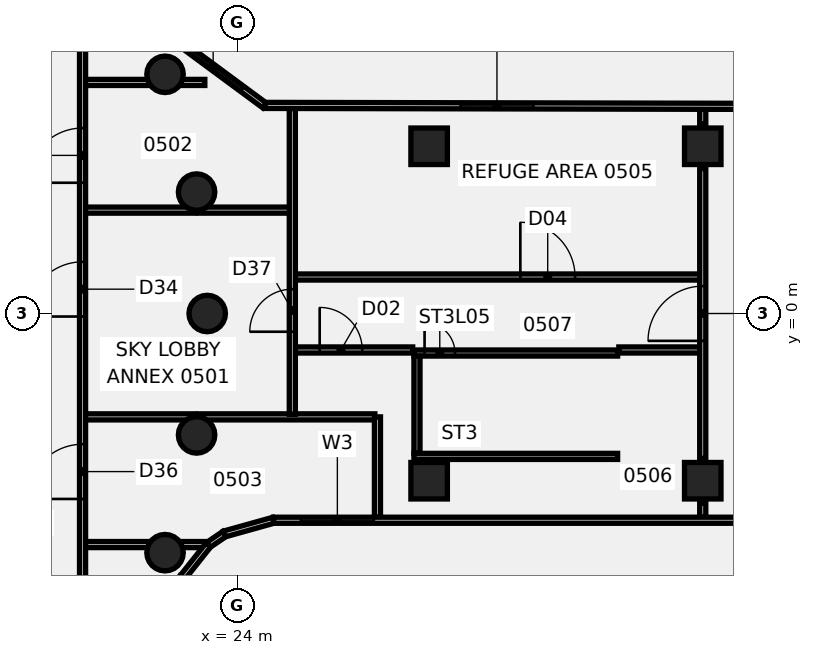
"""IFC4 building model, lengths in metres.
Left out: names, types, materials, properties, quantities, classifications, styles, units other than length and angle.
Written with IfcOpenShell. Run it as: python <this file> out.ifc"""

import sys

from ifc_helpers import new_model, si_unit, direction, frame, frame_2d, origin, origin_2d, place, context, subcontext, project, spatial, polyline, rectangle, circle, outline, extrude, element, fill, save


model = new_model("IFC4")
c1 = context("Model", 3, precision=1e-05, world=origin(), true_north=direction((0.0, 1.0)))
c2 = subcontext(c1, "Body", "Model", "MODEL_VIEW")
j1 = project(units=[si_unit("LENGTHUNIT", "METRE"), si_unit("PLANEANGLEUNIT", "RADIAN")], contexts=[c1])
p1 = place(None, origin())
s1 = spatial("IfcSite", under=j1, at=p1, CompositionType="ELEMENT")
p2 = place(p1, origin())
s2 = spatial("IfcBuilding", under=s1, at=p2, CompositionType="ELEMENT")
p3 = place(p2, frame((0.0, 0.0, 29.5)))
s3 = spatial("IfcBuildingStorey", under=s2, at=p3, CompositionType="ELEMENT", Elevation=29.5)
for number, where, z_axis, x_axis in (
    (1, (23.0, 0.0, -0.6), (0.0, 0.0, 1.0), (1.0, 0.0, 0.0)),
    (2, (22.651, 3.994, -0.6), (0.0, 0.0, 1.0), (1.0, 0.0, 0.0)),
    (3, (21.613, 7.866, -0.6), (0.0, 0.0, 1.0), (1.0, 0.0, 0.0)),
    (4, (21.613, -7.866, -0.6), (0.0, 0.0, 1.0), (1.0, 0.0, 0.0)),
    (5, (22.651, -3.994, -0.6), (0.0, 0.0, 1.0), (1.0, 0.0, 0.0)),
):
    element("IfcColumn", number, at=place(p3, frame(where, z_axis=z_axis, x_axis=x_axis)), inside=s3, PredefinedType="COLUMN", context=c2, shape_type="SweptSolid", body=[
        extrude(circle(Radius=0.6, at=origin_2d()), origin(), (0.0, 0.0, 1.0), 4.96),
    ])
p4 = place(p3, frame((39.3, 5.5, -0.6), z_axis=(0.0, 0.0, 1.0), x_axis=(1.0, 0.0, 0.0)))
e6 = element("IfcColumn", 6, at=p4, inside=s3, PredefinedType="COLUMN", context=c2, shape_type="SweptSolid", body=[
    extrude(rectangle(XDim=1.2, YDim=1.2, at=origin_2d()), origin(), (0.0, 0.0, 1.0), 4.926),
])
p5 = place(p3, frame((39.3, -5.5, -0.6), z_axis=(0.0, 0.0, 1.0), x_axis=(1.0, 0.0, 0.0)))
e7 = element("IfcColumn", 7, at=p5, inside=s3, PredefinedType="COLUMN", context=c2, shape_type="SweptSolid", body=[
    extrude(rectangle(XDim=1.2, YDim=1.2, at=origin_2d()), origin(), (0.0, 0.0, 1.0), 4.926),
])
for number, where, z_axis, x_axis in (
    (8, (30.3, 5.5, -0.6), (0.0, 0.0, 1.0), (1.0, 0.0, 0.0)),
    (9, (30.3, -5.5, -0.6), (0.0, 0.0, 1.0), (1.0, 0.0, 0.0)),
):
    element("IfcColumn", number, at=place(p3, frame(where, z_axis=z_axis, x_axis=x_axis)), inside=s3, PredefinedType="COLUMN", context=c2, shape_type="SweptSolid", body=[
        extrude(rectangle(XDim=1.2, YDim=1.2, at=origin_2d()), origin(), (0.0, 0.0, 1.0), 4.939),
    ])
p6 = place(p3, frame((25.885, -1.2, 0.0), z_axis=(0.0, 0.0, 1.0), x_axis=(1.0, 0.0, 0.0)))
e10 = element("IfcWall", 10, at=p6, inside=s3, PredefinedType="PARTITIONING", context=c2, shape_type="SweptSolid", body=[
    extrude(rectangle(XDim=3.875, YDim=0.2, at=frame_2d((1.938, 0.0))), origin(), (0.0, 0.0, 1.0), 3.76),
])
p7 = place(p6, frame((0.815, 0.0, 0.0)))
e11 = element("IfcOpeningElement", 11, at=p7, cuts=e10, PredefinedType="OPENING", context=c2, shape_type="SweptSolid", body=[
    extrude(rectangle(XDim=1.4, YDim=2.1, at=frame_2d((0.7, 1.05))), frame((0.0, 0.11, 0.0), z_axis=(0.0, -1.0, 0.0), x_axis=(1.0, 0.0, 0.0)), (0.0, 0.0, 1.0), 0.22),
])
p8 = place(p3, frame((36.54, -1.2, 0.0), z_axis=(0.0, 0.0, 1.0), x_axis=(1.0, 0.0, 0.0)))
e12 = element("IfcWall", 12, at=p8, inside=s3, PredefinedType="PARTITIONING", context=c2, shape_type="SweptSolid", body=[
    extrude(rectangle(XDim=2.68, YDim=0.2, at=frame_2d((1.34, 0.0))), origin(), (0.0, 0.0, 1.0), 3.76),
])
p9 = place(p3, frame((25.885, 1.2, 0.0), z_axis=(0.0, 0.0, 1.0), x_axis=(1.0, 0.0, 0.0)))
e13 = element("IfcWall", 13, at=p9, inside=s3, PredefinedType="PARTITIONING", context=c2, shape_type="SweptSolid", body=[
    extrude(rectangle(XDim=13.335, YDim=0.2, at=frame_2d((6.667, 0.0))), origin(), (0.0, 0.0, 1.0), 3.76),
])
p10 = place(p9, frame((7.415, 0.0, 0.0)))
e14 = element("IfcOpeningElement", 14, at=p10, cuts=e13, PredefinedType="OPENING", context=c2, shape_type="SweptSolid", body=[
    extrude(rectangle(XDim=1.8, YDim=2.1, at=frame_2d((0.9, 1.05))), frame((0.0, 0.11, 0.0), z_axis=(0.0, -1.0, 0.0), x_axis=(1.0, 0.0, 0.0)), (0.0, 0.0, 1.0), 0.22),
])
p11 = place(p3, frame((18.985, 3.4, 0.0), z_axis=(0.0, 0.0, 1.0), x_axis=(1.0, 0.0, 0.0)))
e15 = element("IfcWall", 15, at=p11, inside=s3, PredefinedType="PARTITIONING", context=c2, shape_type="SweptSolid", body=[
    extrude(rectangle(XDim=3.605, YDim=0.2, at=frame_2d((1.803, 0.0))), origin(), (0.0, 0.0, 1.0), 3.76),
])
p12 = place(p3, frame((22.711, 3.4, 0.0), z_axis=(0.0, 0.0, 1.0), x_axis=(1.0, 0.0, 0.0)))
e16 = element("IfcWall", 16, at=p12, inside=s3, PredefinedType="PARTITIONING", context=c2, shape_type="SweptSolid", body=[
    extrude(rectangle(XDim=3.004, YDim=0.2, at=frame_2d((1.502, 0.0))), origin(), (0.0, 0.0, 1.0), 3.76),
])
p13 = place(p3, frame((18.985, -3.4, 0.0), z_axis=(0.0, 0.0, 1.0), x_axis=(1.0, 0.0, 0.0)))
e17 = element("IfcWall", 17, at=p13, inside=s3, PredefinedType="PARTITIONING", context=c2, shape_type="SweptSolid", body=[
    extrude(rectangle(XDim=3.605, YDim=0.2, at=frame_2d((1.803, 0.0))), origin(), (0.0, 0.0, 1.0), 3.76),
])
p14 = place(p3, frame((22.711, -3.4, 0.0), z_axis=(0.0, 0.0, 1.0), x_axis=(1.0, 0.0, 0.0)))
e18 = element("IfcWall", 18, at=p14, inside=s3, PredefinedType="PARTITIONING", context=c2, shape_type="SweptSolid", body=[
    extrude(rectangle(XDim=5.804, YDim=0.2, at=frame_2d((2.902, 0.0))), origin(), (0.0, 0.0, 1.0), 3.76),
])
p15 = place(p3, frame((18.985, -7.6, 0.0), z_axis=(0.0, 0.0, 1.0), x_axis=(1.0, 0.0, 0.0)))
e19 = element("IfcWall", 19, at=p15, inside=s3, PredefinedType="PARTITIONING", context=c2, shape_type="SweptSolid", body=[
    extrude(rectangle(XDim=2.089, YDim=0.2, at=frame_2d((1.044, 0.0))), origin(), (0.0, 0.0, 1.0), 3.76),
])
p16 = place(p3, frame((22.152, -7.6, 0.0), z_axis=(0.0, 0.0, 1.0), x_axis=(1.0, 0.0, 0.0)))
e20 = element("IfcWall", 20, at=p16, inside=s3, PredefinedType="PARTITIONING", context=c2, shape_type="SweptSolid", body=[
    extrude(rectangle(XDim=0.769, YDim=0.2, at=frame_2d((0.385, 0.0))), origin(), (0.0, 0.0, 1.0), 3.76),
])
p17 = place(p3, frame((18.985, 7.6, 0.0), z_axis=(0.0, 0.0, 1.0), x_axis=(1.0, 0.0, 0.0)))
e21 = element("IfcWall", 21, at=p17, inside=s3, PredefinedType="PARTITIONING", context=c2, shape_type="SweptSolid", body=[
    extrude(rectangle(XDim=2.089, YDim=0.2, at=frame_2d((1.044, 0.0))), origin(), (0.0, 0.0, 1.0), 3.76),
])
p18 = place(p3, frame((22.152, 7.6, 0.0), z_axis=(0.0, 0.0, 1.0), x_axis=(1.0, 0.0, 0.0)))
e22 = element("IfcWall", 22, at=p18, inside=s3, PredefinedType="PARTITIONING", context=c2, shape_type="SweptSolid", body=[
    extrude(rectangle(XDim=0.77, YDim=0.2, at=frame_2d((0.385, 0.0))), origin(), (0.0, 0.0, 1.0), 3.76),
])
p19 = place(p3, frame((18.9, -10.1, 0.0), z_axis=(0.0, 0.0, 1.0), x_axis=(0.0, 1.0, 0.0)))
e23 = element("IfcWall", 23, at=p19, inside=s3, PredefinedType="PARTITIONING", context=c2, shape_type="SweptSolid", body=[
    extrude(rectangle(XDim=20.2, YDim=0.2, at=frame_2d((10.1, 0.0))), origin(), (0.0, 0.0, 1.0), 3.76),
])
p20 = place(p19, frame((10.0, 0.0, 0.0)))
e24 = element("IfcOpeningElement", 24, at=p20, cuts=e23, PredefinedType="OPENING", context=c2, shape_type="SweptSolid", body=[
    extrude(rectangle(XDim=1.8, YDim=2.1, at=frame_2d((0.9, 1.05))), frame((0.0, 0.11, 0.0), z_axis=(0.0, -1.0, 0.0), x_axis=(1.0, 0.0, 0.0)), (0.0, 0.0, 1.0), 0.22),
])
p21 = place(p19, frame((14.4, 0.0, 0.0)))
e25 = element("IfcOpeningElement", 25, at=p21, cuts=e23, PredefinedType="OPENING", context=c2, shape_type="SweptSolid", body=[
    extrude(rectangle(XDim=1.8, YDim=2.1, at=frame_2d((0.9, 1.05))), frame((0.0, 0.11, 0.0), z_axis=(0.0, -1.0, 0.0), x_axis=(1.0, 0.0, 0.0)), (0.0, 0.0, 1.0), 0.22),
])
p22 = place(p19, frame((4.0, 0.0, 0.0)))
e26 = element("IfcOpeningElement", 26, at=p22, cuts=e23, PredefinedType="OPENING", context=c2, shape_type="SweptSolid", body=[
    extrude(rectangle(XDim=1.8, YDim=2.1, at=frame_2d((0.9, 1.05))), frame((0.0, 0.11, 0.0), z_axis=(0.0, -1.0, 0.0), x_axis=(1.0, 0.0, 0.0)), (0.0, 0.0, 1.0), 0.22),
])
p23 = place(p3, frame((25.8, -3.315, 0.0), z_axis=(0.0, 0.0, 1.0), x_axis=(0.0, 1.0, 0.0)))
e27 = element("IfcWall", 27, at=p23, inside=s3, PredefinedType="PARTITIONING", context=c2, shape_type="SweptSolid", body=[
    extrude(rectangle(XDim=10.057, YDim=0.2, at=frame_2d((5.028, 0.0))), origin(), (0.0, 0.0, 1.0), 3.76),
])
p24 = place(p23, frame((2.715, 0.0, 0.0)))
e28 = element("IfcOpeningElement", 28, at=p24, cuts=e27, PredefinedType="OPENING", context=c2, shape_type="SweptSolid", body=[
    extrude(rectangle(XDim=1.4, YDim=2.1, at=frame_2d((0.7, 1.05))), frame((0.0, 0.11, 0.0), z_axis=(0.0, -1.0, 0.0), x_axis=(1.0, 0.0, 0.0)), (0.0, 0.0, 1.0), 0.22),
])
p25 = place(p3, frame((28.6, -6.699, 0.0), z_axis=(0.0, 0.0, 1.0), x_axis=(0.0, 1.0, 0.0)))
e29 = element("IfcWall", 29, at=p25, inside=s3, PredefinedType="PARTITIONING", context=c2, shape_type="SweptSolid", body=[
    extrude(rectangle(XDim=3.299, YDim=0.2, at=frame_2d((1.649, 0.0))), origin(), (0.0, 0.0, 1.0), 3.76),
])
p26 = place(p3, frame((39.3, -6.699, 0.0), z_axis=(0.0, 0.0, 1.0), x_axis=(0.0, 1.0, 0.0)))
e30 = element("IfcWall", 30, at=p26, inside=s3, PredefinedType="PARTITIONING", context=c2, shape_type="SweptSolid", body=[
    extrude(rectangle(XDim=0.469, YDim=0.2, at=frame_2d((0.234, 0.0))), origin(), (0.0, 0.0, 1.0), 3.76),
])
p27 = place(p3, frame((39.3, -4.77, 0.0), z_axis=(0.0, 0.0, 1.0), x_axis=(0.0, 1.0, 0.0)))
e31 = element("IfcWall", 31, at=p27, inside=s3, PredefinedType="PARTITIONING", context=c2, shape_type="SweptSolid", body=[
    extrude(rectangle(XDim=9.54, YDim=0.2, at=frame_2d((4.77, 0.0))), origin(), (0.0, 0.0, 1.0), 3.76),
])
p28 = place(p27, frame((3.87, 0.0, 0.0)))
e32 = element("IfcOpeningElement", 32, at=p28, cuts=e31, PredefinedType="OPENING", context=c2, shape_type="SweptSolid", body=[
    extrude(rectangle(XDim=1.8, YDim=2.1, at=frame_2d((0.9, 1.05))), frame((0.0, 0.11, 0.0), z_axis=(0.0, -1.0, 0.0), x_axis=(1.0, 0.0, 0.0)), (0.0, 0.0, 1.0), 0.22),
])
p29 = place(p3, frame((39.3, 6.23, 0.0), z_axis=(0.0, 0.0, 1.0), x_axis=(0.0, 1.0, 0.0)))
e33 = element("IfcWall", 33, at=p29, inside=s3, PredefinedType="PARTITIONING", context=c2, shape_type="SweptSolid", body=[
    extrude(rectangle(XDim=0.485, YDim=0.2, at=frame_2d((0.243, 0.0))), origin(), (0.0, 0.0, 1.0), 3.76),
])
p30 = place(p3, frame((22.185, -8.687, 0.0), z_axis=(0.0, 0.0, 1.0), x_axis=(0.62233065952, 0.782754463559, 0.0)))
e34 = element("IfcWall", 34, at=p30, inside=s3, PredefinedType="SOLIDWALL", context=c2, shape_type="SweptSolid", body=[
    extrude(rectangle(XDim=1.374, YDim=0.2, at=frame_2d((0.687, 0.0))), origin(), (0.0, 0.0, 1.0), 4.36),
])
p31 = place(p3, frame((23.041, -7.611, 0.0), z_axis=(0.0, 0.0, 1.0), x_axis=(0.825718659987, 0.564082170033, 0.0)))
e35 = element("IfcWall", 35, at=p31, inside=s3, PredefinedType="SOLIDWALL", context=c2, shape_type="SweptSolid", body=[
    extrude(rectangle(XDim=0.64, YDim=0.2, at=frame_2d((0.32, 0.0))), origin(), (0.0, 0.0, 1.0), 4.36),
])
p32 = place(p3, frame((23.569, -7.25, 0.0), z_axis=(0.0, 0.0, 1.0), x_axis=(0.963195423153, 0.268802114608, 0.0)))
e36 = element("IfcWall", 36, at=p32, inside=s3, PredefinedType="SOLIDWALL", context=c2, shape_type="SweptSolid", body=[
    extrude(rectangle(XDim=1.674, YDim=0.2, at=frame_2d((0.837, 0.0))), origin(), (0.0, 0.0, 1.0), 4.36),
])
p33 = place(p3, frame((25.181, -6.8, 0.0), z_axis=(0.0, 0.0, 1.0), x_axis=(1.0, 0.0, 0.0)))
e37 = element("IfcWall", 37, at=p33, inside=s3, PredefinedType="SOLIDWALL", context=c2, shape_type="SweptSolid", body=[
    extrude(rectangle(XDim=22.3, YDim=0.2, at=frame_2d((11.15, 0.0))), origin(), (0.0, 0.0, 1.0), 4.36),
])
p34 = place(p33, frame((0.9, 0.0, 1.4)))
e38 = element("IfcOpeningElement", 38, at=p34, cuts=e37, PredefinedType="OPENING", context=c2, shape_type="SweptSolid", body=[
    extrude(rectangle(XDim=2.4, YDim=2.1, at=frame_2d((1.2, 1.05))), frame((0.0, 0.11, 0.0), z_axis=(0.0, -1.0, 0.0), x_axis=(1.0, 0.0, 0.0)), (0.0, 0.0, 1.0), 0.22),
])
p35 = place(p3, frame((47.481, 6.8, 0.0), z_axis=(0.0, 0.0, 1.0), x_axis=(-0.999998066603, 0.001966415802, 0.0)))
e39 = element("IfcWall", 39, at=p35, inside=s3, PredefinedType="SOLIDWALL", context=c2, shape_type="SweptSolid", body=[
    extrude(rectangle(XDim=22.596, YDim=0.2, at=frame_2d((11.298, 0.0))), origin(), (0.0, 0.0, 1.0), 4.36),
])
p36 = place(p35, frame((3.3, 0.0, 1.4)))
e40 = element("IfcOpeningElement", 40, at=p36, cuts=e39, PredefinedType="OPENING", context=c2, shape_type="SweptSolid", body=[
    extrude(rectangle(XDim=2.4, YDim=2.1, at=frame_2d((1.2, 1.05))), frame((0.0, 0.11, 0.0), z_axis=(0.0, -1.0, 0.0), x_axis=(1.0, 0.0, 0.0)), (0.0, 0.0, 1.0), 0.22),
])
p37 = place(p35, frame((13.75, 0.0, 1.4)))
e41 = element("IfcOpeningElement", 41, at=p37, cuts=e39, PredefinedType="OPENING", context=c2, shape_type="SweptSolid", body=[
    extrude(rectangle(XDim=2.4, YDim=2.1, at=frame_2d((1.2, 1.05))), frame((0.0, 0.11, 0.0), z_axis=(0.0, -1.0, 0.0), x_axis=(1.0, 0.0, 0.0)), (0.0, 0.0, 1.0), 0.22),
])
p38 = place(p3, frame((24.885, 6.844, 0.0), z_axis=(0.0, 0.0, 1.0), x_axis=(-0.804392246617, 0.594098572278, 0.0)))
e42 = element("IfcWall", 42, at=p38, inside=s3, PredefinedType="SOLIDWALL", context=c2, shape_type="SweptSolid", body=[
    extrude(rectangle(XDim=3.544, YDim=0.2, at=frame_2d((1.772, 0.0))), origin(), (0.0, 0.0, 1.0), 4.36),
])
p39 = place(p38, frame((0.9, 0.0, 1.4)))
e43 = element("IfcOpeningElement", 43, at=p39, cuts=e42, PredefinedType="OPENING", context=c2, shape_type="SweptSolid", body=[
    extrude(rectangle(XDim=2.4, YDim=2.1, at=frame_2d((1.2, 1.05))), frame((0.0, 0.11, 0.0), z_axis=(0.0, -1.0, 0.0), x_axis=(1.0, 0.0, 0.0)), (0.0, 0.0, 1.0), 0.22),
])
p40 = place(p3, frame((29.8, -1.3, 0.0), z_axis=(0.0, 0.0, 1.0), x_axis=(1.0, 0.0, 0.0)))
e44 = element("IfcWall", 44, at=p40, inside=s3, PredefinedType="SHEAR", context=c2, shape_type="SweptSolid", body=[
    extrude(rectangle(XDim=6.7, YDim=0.2, at=frame_2d((3.35, 0.0))), origin(), (0.0, 0.0, 1.0), 3.76),
])
p41 = place(p40, frame((0.35, 0.0, 0.0)))
e45 = element("IfcOpeningElement", 45, at=p41, cuts=e44, PredefinedType="OPENING", context=c2, shape_type="SweptSolid", body=[
    extrude(rectangle(XDim=1.0, YDim=2.1, at=frame_2d((0.5, 1.05))), frame((0.0, 0.11, 0.0), z_axis=(0.0, -1.0, 0.0), x_axis=(1.0, 0.0, 0.0)), (0.0, 0.0, 1.0), 0.22),
])
p42 = place(p3, frame((29.8, -4.7, 0.0), z_axis=(0.0, 0.0, 1.0), x_axis=(1.0, 0.0, 0.0)))
e46 = element("IfcWall", 46, at=p42, inside=s3, PredefinedType="SHEAR", context=c2, shape_type="SweptSolid", body=[
    extrude(rectangle(XDim=6.7, YDim=0.2, at=frame_2d((3.35, 0.0))), origin(), (0.0, 0.0, 1.0), 3.76),
])
p43 = place(p3, frame((29.9, -4.6, 0.0), z_axis=(0.0, 0.0, 1.0), x_axis=(0.0, 1.0, 0.0)))
e47 = element("IfcWall", 47, at=p43, inside=s3, PredefinedType="SHEAR", context=c2, shape_type="SweptSolid", body=[
    extrude(rectangle(XDim=3.2, YDim=0.2, at=frame_2d((1.6, 0.0))), origin(), (0.0, 0.0, 1.0), 3.76),
])
p44 = place(p3, origin())
e48 = element("IfcWall", 48, at=p44, inside=s3, PredefinedType="SHEAR", context=c2, shape_type="SweptSolid", body=[
    extrude(outline(polyline([(36.3, -4.6), (36.5, -4.6), (36.5, -1.4), (36.3, -1.4), (36.3, -4.6)])), origin(), (0.0, 0.0, 1.0), 3.76),
])
p45 = place(p7, frame((1.4, 0.0, 0.0), z_axis=(0.0, 0.0, 1.0), x_axis=(-1.0, 0.0, 0.0)))
e49 = element("IfcDoor", 49, at=p45, inside=s3, OperationType="DOUBLE_DOOR_SINGLE_SWING", PredefinedType="DOOR", context=c2, shape_type="SweptSolid", body=[
    extrude(rectangle(XDim=1.4, YDim=2.1, at=frame_2d((0.7, 1.05))), frame((0.0, 0.025, 0.0), z_axis=(0.0, -1.0, 0.0), x_axis=(1.0, 0.0, 0.0)), (0.0, 0.0, 1.0), 0.05),
])
fill(e11, e49)
p46 = place(p10, origin())
e50 = element("IfcDoor", 50, at=p46, inside=s3, OperationType="DOUBLE_DOOR_SINGLE_SWING", PredefinedType="DOOR", context=c2, shape_type="SweptSolid", body=[
    extrude(rectangle(XDim=1.8, YDim=2.1, at=frame_2d((0.9, 1.05))), frame((0.0, 0.025, 0.0), z_axis=(0.0, -1.0, 0.0), x_axis=(1.0, 0.0, 0.0)), (0.0, 0.0, 1.0), 0.05),
])
fill(e14, e50)
p47 = place(p20, origin())
e51 = element("IfcDoor", 51, at=p47, inside=s3, OperationType="DOUBLE_DOOR_SINGLE_SWING", PredefinedType="DOOR", context=c2, shape_type="SweptSolid", body=[
    extrude(rectangle(XDim=1.8, YDim=2.1, at=frame_2d((0.9, 1.05))), frame((0.0, 0.025, 0.0), z_axis=(0.0, -1.0, 0.0), x_axis=(1.0, 0.0, 0.0)), (0.0, 0.0, 1.0), 0.05),
])
fill(e24, e51)
p48 = place(p21, frame((1.8, 0.0, 0.0), z_axis=(0.0, 0.0, 1.0), x_axis=(-1.0, 0.0, 0.0)))
e52 = element("IfcDoor", 52, at=p48, inside=s3, OperationType="DOUBLE_DOOR_SINGLE_SWING", PredefinedType="DOOR", context=c2, shape_type="SweptSolid", body=[
    extrude(rectangle(XDim=1.8, YDim=2.1, at=frame_2d((0.9, 1.05))), frame((0.0, 0.025, 0.0), z_axis=(0.0, -1.0, 0.0), x_axis=(1.0, 0.0, 0.0)), (0.0, 0.0, 1.0), 0.05),
])
fill(e25, e52)
p49 = place(p22, frame((1.8, 0.0, 0.0), z_axis=(0.0, 0.0, 1.0), x_axis=(-1.0, 0.0, 0.0)))
e53 = element("IfcDoor", 53, at=p49, inside=s3, OperationType="DOUBLE_DOOR_SINGLE_SWING", PredefinedType="DOOR", context=c2, shape_type="SweptSolid", body=[
    extrude(rectangle(XDim=1.8, YDim=2.1, at=frame_2d((0.9, 1.05))), frame((0.0, 0.025, 0.0), z_axis=(0.0, -1.0, 0.0), x_axis=(1.0, 0.0, 0.0)), (0.0, 0.0, 1.0), 0.05),
])
fill(e26, e53)
p50 = place(p24, origin())
e54 = element("IfcDoor", 54, at=p50, inside=s3, OperationType="DOUBLE_DOOR_SINGLE_SWING", PredefinedType="DOOR", context=c2, shape_type="SweptSolid", body=[
    extrude(rectangle(XDim=1.4, YDim=2.1, at=frame_2d((0.7, 1.05))), frame((0.0, 0.025, 0.0), z_axis=(0.0, -1.0, 0.0), x_axis=(1.0, 0.0, 0.0)), (0.0, 0.0, 1.0), 0.05),
])
fill(e28, e54)
p51 = place(p28, frame((1.8, 0.0, 0.0), z_axis=(0.0, 0.0, 1.0), x_axis=(-1.0, 0.0, 0.0)))
e55 = element("IfcDoor", 55, at=p51, inside=s3, OperationType="DOUBLE_DOOR_SINGLE_SWING", PredefinedType="DOOR", context=c2, shape_type="SweptSolid", body=[
    extrude(rectangle(XDim=1.8, YDim=2.1, at=frame_2d((0.9, 1.05))), frame((0.0, 0.025, 0.0), z_axis=(0.0, -1.0, 0.0), x_axis=(1.0, 0.0, 0.0)), (0.0, 0.0, 1.0), 0.05),
])
fill(e32, e55)
p52 = place(p39, origin())
e56 = element("IfcWindow", 56, at=p52, inside=s3, PartitioningType="SINGLE_PANEL", PredefinedType="WINDOW", context=c2, shape_type="SweptSolid", body=[
    extrude(rectangle(XDim=2.4, YDim=2.1, at=frame_2d((1.2, 1.05))), frame((0.0, 0.03, 0.0), z_axis=(0.0, -1.0, 0.0), x_axis=(1.0, 0.0, 0.0)), (0.0, 0.0, 1.0), 0.06),
])
fill(e43, e56)
p53 = place(p34, origin())
e57 = element("IfcWindow", 57, at=p53, inside=s3, PartitioningType="SINGLE_PANEL", PredefinedType="WINDOW", context=c2, shape_type="SweptSolid", body=[
    extrude(rectangle(XDim=2.4, YDim=2.1, at=frame_2d((1.2, 1.05))), frame((0.0, 0.03, 0.0), z_axis=(0.0, -1.0, 0.0), x_axis=(1.0, 0.0, 0.0)), (0.0, 0.0, 1.0), 0.06),
])
fill(e38, e57)
p54 = place(p37, origin())
e58 = element("IfcWindow", 58, at=p54, inside=s3, PartitioningType="SINGLE_PANEL", PredefinedType="WINDOW", context=c2, shape_type="SweptSolid", body=[
    extrude(rectangle(XDim=2.4, YDim=2.1, at=frame_2d((1.2, 1.05))), frame((0.0, 0.03, 0.0), z_axis=(0.0, -1.0, 0.0), x_axis=(1.0, 0.0, 0.0)), (0.0, 0.0, 1.0), 0.06),
])
fill(e41, e58)
p55 = place(p41, origin())
e59 = element("IfcDoor", 59, at=p55, inside=s3, OperationType="SINGLE_SWING_LEFT", PredefinedType="DOOR", context=c2, shape_type="SweptSolid", body=[
    extrude(rectangle(XDim=1.0, YDim=2.1, at=frame_2d((0.5, 1.05))), frame((0.0, 0.025, 0.0), z_axis=(0.0, -1.0, 0.0), x_axis=(1.0, 0.0, 0.0)), (0.0, 0.0, 1.0), 0.05),
])
fill(e45, e59)
save(model, sys.argv[1])
